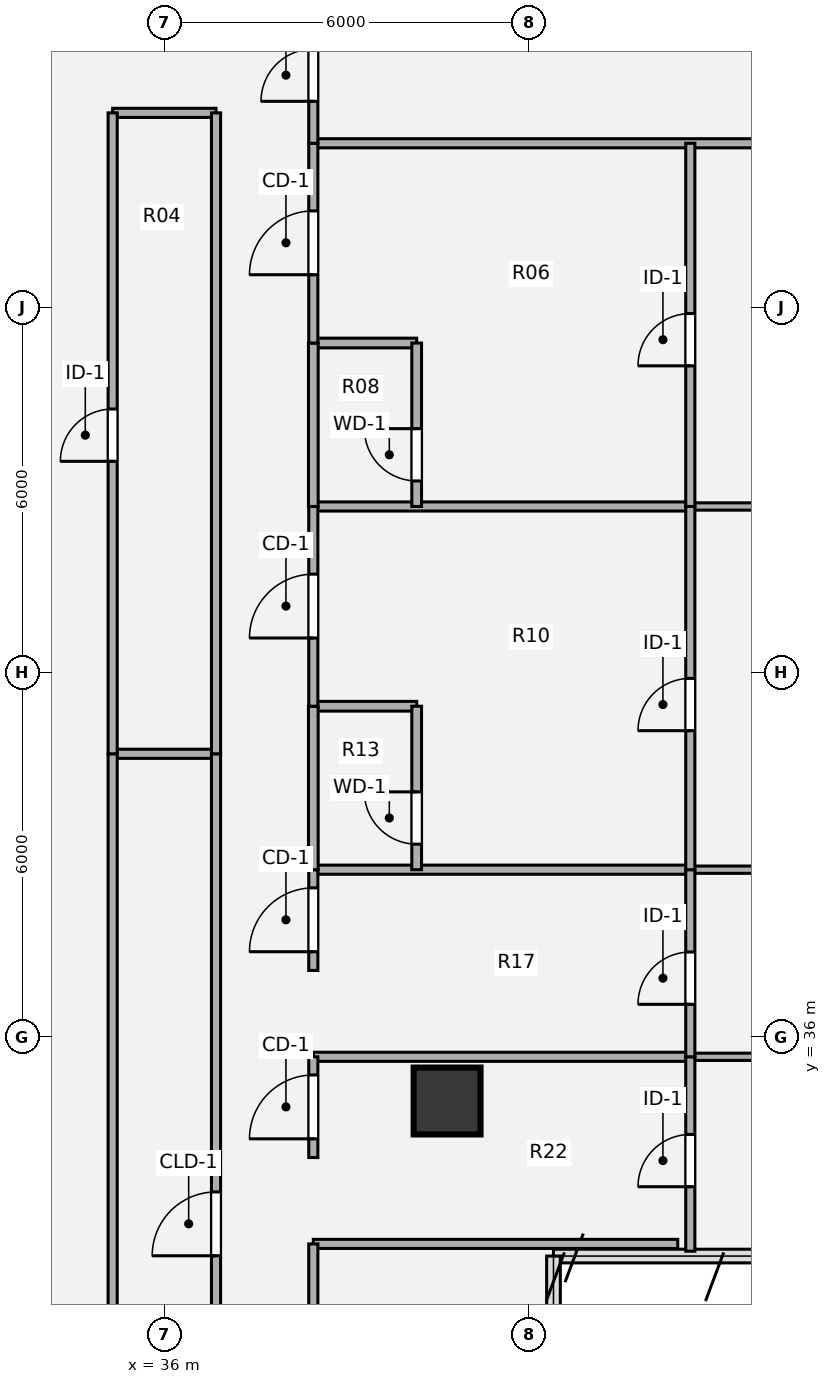
"""IFC4 building model, lengths in metres.
Left out: names, types, materials, properties, quantities, classifications, styles, units other than length and angle.
Written with IfcOpenShell. Run it as: python <this file> out.ifc"""

import sys

from ifc_helpers import new_model, si_unit, direction, frame, frame_2d, origin, origin_2d, place, context, subcontext, project, spatial, rectangle, hollow_circle, extrude, source, transform, mapped, element, fill, save


model = new_model("IFC4")
c1 = context("Model", 3, precision=1e-05, world=origin(), true_north=direction((0.0, 1.0)))
c2 = subcontext(c1, "Body", "Model", "MODEL_VIEW")
j1 = project(units=[si_unit("LENGTHUNIT", "METRE"), si_unit("PLANEANGLEUNIT", "RADIAN")], contexts=[c1])
p1 = place(None, origin())
s1 = spatial("IfcSite", under=j1, at=p1, CompositionType="ELEMENT")
p2 = place(p1, origin())
s2 = spatial("IfcBuilding", under=s1, at=p2, CompositionType="ELEMENT")
p3 = place(p2, frame((0.0, 0.0, 171.54)))
s3 = spatial("IfcBuildingStorey", under=s2, at=p3, CompositionType="ELEMENT", Elevation=171.54)
m1 = source(origin(), c2, "Body", "SweptSolid", [
    extrude(hollow_circle(Radius=0.55, WallThickness=0.04, at=origin_2d()), origin(), (0.0, 0.0, 1.0), 3.78),
])
p4 = place(p3, frame((40.65, 34.95, 0.0), z_axis=(0.0, 0.0, 1.0), x_axis=(1.0, 0.0, 0.0)))
e1 = element("IfcColumn", 1, at=p4, inside=s3, PredefinedType="COLUMN", context=c2, shape_type="MappedRepresentation", body=[
    mapped(m1, transform((0.0, 0.0, 0.0), x_axis=(1.0, 0.0, 0.0), y_axis=(0.0, 1.0, 0.0), z_axis=(0.0, 0.0, 1.0), scale=1.0)),
])
p5 = place(p3, frame((38.45, 32.6, 0.0), z_axis=(0.0, 0.0, 1.0), x_axis=(1.0, 0.0, 0.0)))
e2 = element("IfcWall", 2, at=p5, inside=s3, PredefinedType="PARTITIONING", context=c2, shape_type="SweptSolid", body=[
    extrude(rectangle(XDim=5.993, YDim=0.15, at=frame_2d((2.997, 0.0))), origin(), (0.0, 0.0, 1.0), 3.5),
])
p6 = place(p3, frame((38.45, 35.677, 0.0), z_axis=(0.0, 0.0, 1.0), x_axis=(1.0, 0.0, 0.0)))
e3 = element("IfcWall", 3, at=p6, inside=s3, PredefinedType="PARTITIONING", context=c2, shape_type="SweptSolid", body=[
    extrude(rectangle(XDim=6.2, YDim=0.15, at=frame_2d((3.1, 0.0))), origin(), (0.0, 0.0, 1.0), 2.982),
])
p7 = place(p3, frame((44.65, 35.677, 0.0), z_axis=(0.0, 0.0, 1.0), x_axis=(1.0, 0.0, 0.0)))
e4 = element("IfcWall", 4, at=p7, inside=s3, PredefinedType="PARTITIONING", context=c2, shape_type="SweptSolid", body=[
    extrude(rectangle(XDim=11.47, YDim=0.12, at=frame_2d((5.735, 0.0))), origin(), (0.0, 0.0, 1.0), 2.982),
])
p8 = place(p3, frame((38.45, 38.754, 0.0), z_axis=(0.0, 0.0, 1.0), x_axis=(1.0, 0.0, 0.0)))
e5 = element("IfcWall", 5, at=p8, inside=s3, PredefinedType="PARTITIONING", context=c2, shape_type="SweptSolid", body=[
    extrude(rectangle(XDim=6.2, YDim=0.15, at=frame_2d((3.1, 0.0))), origin(), (0.0, 0.0, 1.0), 2.982),
])
p9 = place(p3, frame((44.65, 38.754, 0.0), z_axis=(0.0, 0.0, 1.0), x_axis=(1.0, 0.0, 0.0)))
e6 = element("IfcWall", 6, at=p9, inside=s3, PredefinedType="PARTITIONING", context=c2, shape_type="SweptSolid", body=[
    extrude(rectangle(XDim=11.47, YDim=0.12, at=frame_2d((5.735, 0.0))), origin(), (0.0, 0.0, 1.0), 2.982),
])
p10 = place(p3, frame((35.15, 40.66, 0.0), z_axis=(0.0, 0.0, 1.0), x_axis=(1.0, 0.0, 0.0)))
e7 = element("IfcWall", 7, at=p10, inside=s3, PredefinedType="PARTITIONING", context=c2, shape_type="SweptSolid", body=[
    extrude(rectangle(XDim=1.7, YDim=0.15, at=frame_2d((0.85, 0.0))), origin(), (0.0, 0.0, 1.0), 3.259),
])
p11 = place(p3, frame((38.45, 41.442, 0.0), z_axis=(0.0, 0.0, 1.0), x_axis=(1.0, 0.0, 0.0)))
e8 = element("IfcWall", 8, at=p11, inside=s3, PredefinedType="PLUMBINGWALL", context=c2, shape_type="SweptSolid", body=[
    extrude(rectangle(XDim=1.7, YDim=0.16, at=frame_2d((0.85, 0.0))), origin(), (0.0, 0.0, 1.0), 3.259),
])
p12 = place(p3, frame((38.45, 44.727, 0.0), z_axis=(0.0, 0.0, 1.0), x_axis=(1.0, 0.0, 0.0)))
e9 = element("IfcWall", 9, at=p12, inside=s3, PredefinedType="PARTITIONING", context=c2, shape_type="SweptSolid", body=[
    extrude(rectangle(XDim=6.2, YDim=0.15, at=frame_2d((3.1, 0.0))), origin(), (0.0, 0.0, 1.0), 3.055),
])
p13 = place(p3, frame((44.65, 44.727, 0.0), z_axis=(0.0, 0.0, 1.0), x_axis=(1.0, 0.0, 0.0)))
e10 = element("IfcWall", 10, at=p13, inside=s3, PredefinedType="PARTITIONING", context=c2, shape_type="SweptSolid", body=[
    extrude(rectangle(XDim=11.47, YDim=0.12, at=frame_2d((5.735, 0.0))), origin(), (0.0, 0.0, 1.0), 3.055),
])
p14 = place(p3, frame((38.45, 47.415, 0.0), z_axis=(0.0, 0.0, 1.0), x_axis=(1.0, 0.0, 0.0)))
e11 = element("IfcWall", 11, at=p14, inside=s3, PredefinedType="PLUMBINGWALL", context=c2, shape_type="SweptSolid", body=[
    extrude(rectangle(XDim=1.7, YDim=0.16, at=frame_2d((0.85, 0.0))), origin(), (0.0, 0.0, 1.0), 3.259),
])
p15 = place(p3, frame((38.45, 50.7, 0.0), z_axis=(0.0, 0.0, 1.0), x_axis=(1.0, 0.0, 0.0)))
e12 = element("IfcWall", 12, at=p15, inside=s3, PredefinedType="PARTITIONING", context=c2, shape_type="SweptSolid", body=[
    extrude(rectangle(XDim=17.569, YDim=0.15, at=frame_2d((8.785, 0.0))), origin(), (0.0, 0.0, 1.0), 3.308),
])
p16 = place(p3, frame((35.15, 51.2, 0.0), z_axis=(0.0, 0.0, 1.0), x_axis=(1.0, 0.0, 0.0)))
e13 = element("IfcWall", 13, at=p16, inside=s3, PredefinedType="PARTITIONING", context=c2, shape_type="SweptSolid", body=[
    extrude(rectangle(XDim=1.7, YDim=0.15, at=frame_2d((0.85, 0.0))), origin(), (0.0, 0.0, 1.0), 3.308),
])
p17 = place(p3, frame((35.15, 25.2, 0.0), z_axis=(0.0, 0.0, 1.0), x_axis=(0.0, 1.0, 0.0)))
e14 = element("IfcWall", 14, at=p17, inside=s3, PredefinedType="PARTITIONING", context=c2, shape_type="SweptSolid", body=[
    extrude(rectangle(XDim=15.46, YDim=0.15, at=frame_2d((7.73, 0.0))), origin(), (0.0, 0.0, 1.0), 3.5),
])
p18 = place(p3, frame((35.15, 40.66, 0.0), z_axis=(0.0, 0.0, 1.0), x_axis=(0.0, 1.0, 0.0)))
e15 = element("IfcWall", 15, at=p18, inside=s3, PredefinedType="PARTITIONING", context=c2, shape_type="SweptSolid", body=[
    extrude(rectangle(XDim=10.54, YDim=0.15, at=frame_2d((5.27, 0.0))), origin(), (0.0, 0.0, 1.0), 3.5),
])
p19 = place(p18, frame((4.81, 0.0, 0.0)))
e16 = element("IfcOpeningElement", 16, at=p19, cuts=e15, PredefinedType="OPENING", context=c2, shape_type="SweptSolid", body=[
    extrude(rectangle(XDim=0.86, YDim=2.1, at=origin_2d()), frame((0.43, 0.085, 1.05), z_axis=(0.0, -1.0, 0.0), x_axis=(1.0, 0.0, 0.0)), (0.0, 0.0, 1.0), 0.17),
])
p20 = place(p3, frame((36.85, 25.2, 0.0), z_axis=(0.0, 0.0, 1.0), x_axis=(0.0, 1.0, 0.0)))
e17 = element("IfcWall", 17, at=p20, inside=s3, PredefinedType="PARTITIONING", context=c2, shape_type="SweptSolid", body=[
    extrude(rectangle(XDim=15.46, YDim=0.15, at=frame_2d((7.73, 0.0))), origin(), (0.0, 0.0, 1.0), 3.5),
])
p21 = place(p20, frame((7.205, 0.0, 0.0)))
e18 = element("IfcOpeningElement", 18, at=p21, cuts=e17, PredefinedType="OPENING", context=c2, shape_type="SweptSolid", body=[
    extrude(rectangle(XDim=1.05, YDim=2.1, at=origin_2d()), frame((0.525, 0.085, 1.05), z_axis=(0.0, -1.0, 0.0), x_axis=(1.0, 0.0, 0.0)), (0.0, 0.0, 1.0), 0.17),
])
p22 = place(p3, frame((36.85, 40.66, 0.0), z_axis=(0.0, 0.0, 1.0), x_axis=(0.0, 1.0, 0.0)))
e19 = element("IfcWall", 19, at=p22, inside=s3, PredefinedType="PARTITIONING", context=c2, shape_type="SweptSolid", body=[
    extrude(rectangle(XDim=10.54, YDim=0.15, at=frame_2d((5.27, 0.0))), origin(), (0.0, 0.0, 1.0), 3.5),
])
p23 = place(p3, frame((38.45, 21.2, 0.0), z_axis=(0.0, 0.0, 1.0), x_axis=(0.0, 1.0, 0.0)))
e20 = element("IfcWall", 20, at=p23, inside=s3, PredefinedType="PARTITIONING", context=c2, shape_type="SweptSolid", body=[
    extrude(rectangle(XDim=11.4, YDim=0.15, at=frame_2d((5.7, 0.0))), origin(), (0.0, 0.0, 1.0), 3.5),
])
p24 = place(p23, frame((5.075, 0.0, 0.0)))
e21 = element("IfcOpeningElement", 21, at=p24, cuts=e20, PredefinedType="OPENING", context=c2, shape_type="SweptSolid", body=[
    extrude(rectangle(XDim=1.05, YDim=2.1, at=origin_2d()), frame((0.525, 0.085, 1.05), z_axis=(0.0, -1.0, 0.0), x_axis=(1.0, 0.0, 0.0)), (0.0, 0.0, 1.0), 0.17),
])
p25 = place(p3, frame((38.45, 34.02, 0.0), z_axis=(0.0, 0.0, 1.0), x_axis=(0.0, 1.0, 0.0)))
e22 = element("IfcWall", 22, at=p25, inside=s3, PredefinedType="PARTITIONING", context=c2, shape_type="SweptSolid", body=[
    extrude(rectangle(XDim=1.657, YDim=0.15, at=frame_2d((0.829, 0.0))), origin(), (0.0, 0.0, 1.0), 3.5),
])
p26 = place(p25, frame((0.308, 0.0, 0.0)))
e23 = element("IfcOpeningElement", 23, at=p26, cuts=e22, PredefinedType="OPENING", context=c2, shape_type="SweptSolid", body=[
    extrude(rectangle(XDim=1.05, YDim=2.1, at=origin_2d()), frame((0.525, 0.085, 1.05), z_axis=(0.0, -1.0, 0.0), x_axis=(1.0, 0.0, 0.0)), (0.0, 0.0, 1.0), 0.17),
])
p27 = place(p3, frame((38.45, 37.097, 0.0), z_axis=(0.0, 0.0, 1.0), x_axis=(0.0, 1.0, 0.0)))
e24 = element("IfcWall", 24, at=p27, inside=s3, PredefinedType="PARTITIONING", context=c2, shape_type="SweptSolid", body=[
    extrude(rectangle(XDim=1.657, YDim=0.15, at=frame_2d((0.829, 0.0))), origin(), (0.0, 0.0, 1.0), 3.5),
])
p28 = place(p27, frame((0.308, 0.0, 0.0)))
e25 = element("IfcOpeningElement", 25, at=p28, cuts=e24, PredefinedType="OPENING", context=c2, shape_type="SweptSolid", body=[
    extrude(rectangle(XDim=1.05, YDim=2.1, at=origin_2d()), frame((0.525, 0.085, 1.05), z_axis=(0.0, -1.0, 0.0), x_axis=(1.0, 0.0, 0.0)), (0.0, 0.0, 1.0), 0.17),
])
p29 = place(p3, frame((38.45, 38.754, 0.0), z_axis=(0.0, 0.0, 1.0), x_axis=(0.0, 1.0, 0.0)))
e26 = element("IfcWall", 26, at=p29, inside=s3, PredefinedType="PLUMBINGWALL", context=c2, shape_type="SweptSolid", body=[
    extrude(rectangle(XDim=2.688, YDim=0.16, at=frame_2d((1.344, 0.0))), origin(), (0.0, 0.0, 1.0), 3.5),
])
p30 = place(p3, frame((38.45, 41.442, 0.0), z_axis=(0.0, 0.0, 1.0), x_axis=(0.0, 1.0, 0.0)))
e27 = element("IfcWall", 27, at=p30, inside=s3, PredefinedType="PARTITIONING", context=c2, shape_type="SweptSolid", body=[
    extrude(rectangle(XDim=3.285, YDim=0.15, at=frame_2d((1.643, 0.0))), origin(), (0.0, 0.0, 1.0), 3.5),
])
p31 = place(p30, frame((1.122, 0.0, 0.0)))
e28 = element("IfcOpeningElement", 28, at=p31, cuts=e27, PredefinedType="OPENING", context=c2, shape_type="SweptSolid", body=[
    extrude(rectangle(XDim=1.05, YDim=2.1, at=origin_2d()), frame((0.525, 0.085, 1.05), z_axis=(0.0, -1.0, 0.0), x_axis=(1.0, 0.0, 0.0)), (0.0, 0.0, 1.0), 0.17),
])
p32 = place(p3, frame((38.45, 44.727, 0.0), z_axis=(0.0, 0.0, 1.0), x_axis=(0.0, 1.0, 0.0)))
e29 = element("IfcWall", 29, at=p32, inside=s3, PredefinedType="PLUMBINGWALL", context=c2, shape_type="SweptSolid", body=[
    extrude(rectangle(XDim=2.688, YDim=0.16, at=frame_2d((1.344, 0.0))), origin(), (0.0, 0.0, 1.0), 3.5),
])
p33 = place(p3, frame((38.45, 47.415, 0.0), z_axis=(0.0, 0.0, 1.0), x_axis=(0.0, 1.0, 0.0)))
e30 = element("IfcWall", 30, at=p33, inside=s3, PredefinedType="PARTITIONING", context=c2, shape_type="SweptSolid", body=[
    extrude(rectangle(XDim=3.285, YDim=0.15, at=frame_2d((1.643, 0.0))), origin(), (0.0, 0.0, 1.0), 3.5),
])
p34 = place(p33, frame((1.123, 0.0, 0.0)))
e31 = element("IfcOpeningElement", 31, at=p34, cuts=e30, PredefinedType="OPENING", context=c2, shape_type="SweptSolid", body=[
    extrude(rectangle(XDim=1.05, YDim=2.1, at=origin_2d()), frame((0.525, 0.085, 1.05), z_axis=(0.0, -1.0, 0.0), x_axis=(1.0, 0.0, 0.0)), (0.0, 0.0, 1.0), 0.17),
])
p35 = place(p3, frame((38.45, 50.7, 0.0), z_axis=(0.0, 0.0, 1.0), x_axis=(0.0, 1.0, 0.0)))
e32 = element("IfcWall", 32, at=p35, inside=s3, PredefinedType="PARTITIONING", context=c2, shape_type="SweptSolid", body=[
    extrude(rectangle(XDim=2.3, YDim=0.15, at=frame_2d((1.15, 0.0))), origin(), (0.0, 0.0, 1.0), 3.5),
])
p36 = place(p35, frame((0.69, 0.0, 0.0)))
e33 = element("IfcOpeningElement", 33, at=p36, cuts=e32, PredefinedType="OPENING", context=c2, shape_type="SweptSolid", body=[
    extrude(rectangle(XDim=0.86, YDim=2.1, at=origin_2d()), frame((0.43, 0.085, 1.05), z_axis=(0.0, -1.0, 0.0), x_axis=(1.0, 0.0, 0.0)), (0.0, 0.0, 1.0), 0.17),
])
p37 = place(p3, frame((40.15, 38.754, 0.0), z_axis=(0.0, 0.0, 1.0), x_axis=(0.0, 1.0, 0.0)))
e34 = element("IfcWall", 34, at=p37, inside=s3, PredefinedType="PLUMBINGWALL", context=c2, shape_type="SweptSolid", body=[
    extrude(rectangle(XDim=2.688, YDim=0.16, at=frame_2d((1.344, 0.0))), origin(), (0.0, 0.0, 1.0), 3.5),
])
p38 = place(p37, frame((0.42, 0.0, 0.0)))
e35 = element("IfcOpeningElement", 35, at=p38, cuts=e34, PredefinedType="OPENING", context=c2, shape_type="SweptSolid", body=[
    extrude(rectangle(XDim=0.86, YDim=2.1, at=origin_2d()), frame((0.43, 0.09, 1.05), z_axis=(0.0, -1.0, 0.0), x_axis=(1.0, 0.0, 0.0)), (0.0, 0.0, 1.0), 0.18),
])
p39 = place(p3, frame((40.15, 44.727, 0.0), z_axis=(0.0, 0.0, 1.0), x_axis=(0.0, 1.0, 0.0)))
e36 = element("IfcWall", 36, at=p39, inside=s3, PredefinedType="PLUMBINGWALL", context=c2, shape_type="SweptSolid", body=[
    extrude(rectangle(XDim=2.688, YDim=0.16, at=frame_2d((1.344, 0.0))), origin(), (0.0, 0.0, 1.0), 3.5),
])
p40 = place(p39, frame((0.42, 0.0, 0.0)))
e37 = element("IfcOpeningElement", 37, at=p40, cuts=e36, PredefinedType="OPENING", context=c2, shape_type="SweptSolid", body=[
    extrude(rectangle(XDim=0.86, YDim=2.1, at=origin_2d()), frame((0.43, 0.09, 1.05), z_axis=(0.0, -1.0, 0.0), x_axis=(1.0, 0.0, 0.0)), (0.0, 0.0, 1.0), 0.18),
])
p41 = place(p3, frame((44.65, 32.48, 0.0), z_axis=(0.0, 0.0, 1.0), x_axis=(0.0, 1.0, 0.0)))
e38 = element("IfcWall", 38, at=p41, inside=s3, PredefinedType="PARTITIONING", context=c2, shape_type="SweptSolid", body=[
    extrude(rectangle(XDim=3.197, YDim=0.15, at=frame_2d((1.599, 0.0))), origin(), (0.0, 0.0, 1.0), 3.5),
])
p42 = place(p41, frame((1.06, 0.0, 0.0)))
e39 = element("IfcOpeningElement", 39, at=p42, cuts=e38, PredefinedType="OPENING", context=c2, shape_type="SweptSolid", body=[
    extrude(rectangle(XDim=0.86, YDim=2.1, at=origin_2d()), frame((0.43, 0.085, 1.05), z_axis=(0.0, -1.0, 0.0), x_axis=(1.0, 0.0, 0.0)), (0.0, 0.0, 1.0), 0.17),
])
p43 = place(p3, frame((44.65, 35.677, 0.0), z_axis=(0.0, 0.0, 1.0), x_axis=(0.0, 1.0, 0.0)))
e40 = element("IfcWall", 40, at=p43, inside=s3, PredefinedType="PARTITIONING", context=c2, shape_type="SweptSolid", body=[
    extrude(rectangle(XDim=3.077, YDim=0.15, at=frame_2d((1.539, 0.0))), origin(), (0.0, 0.0, 1.0), 3.5),
])
p44 = place(p43, frame((0.863, 0.0, 0.0)))
e41 = element("IfcOpeningElement", 41, at=p44, cuts=e40, PredefinedType="OPENING", context=c2, shape_type="SweptSolid", body=[
    extrude(rectangle(XDim=0.86, YDim=2.1, at=origin_2d()), frame((0.43, 0.085, 1.05), z_axis=(0.0, -1.0, 0.0), x_axis=(1.0, 0.0, 0.0)), (0.0, 0.0, 1.0), 0.17),
])
p45 = place(p3, frame((44.65, 38.754, 0.0), z_axis=(0.0, 0.0, 1.0), x_axis=(0.0, 1.0, 0.0)))
e42 = element("IfcWall", 42, at=p45, inside=s3, PredefinedType="PARTITIONING", context=c2, shape_type="SweptSolid", body=[
    extrude(rectangle(XDim=5.973, YDim=0.15, at=frame_2d((2.987, 0.0))), origin(), (0.0, 0.0, 1.0), 3.5),
])
p46 = place(p45, frame((2.286, 0.0, 0.0)))
e43 = element("IfcOpeningElement", 43, at=p46, cuts=e42, PredefinedType="OPENING", context=c2, shape_type="SweptSolid", body=[
    extrude(rectangle(XDim=0.86, YDim=2.1, at=origin_2d()), frame((0.43, 0.085, 1.05), z_axis=(0.0, -1.0, 0.0), x_axis=(1.0, 0.0, 0.0)), (0.0, 0.0, 1.0), 0.17),
])
p47 = place(p3, frame((44.65, 44.727, 0.0), z_axis=(0.0, 0.0, 1.0), x_axis=(0.0, 1.0, 0.0)))
e44 = element("IfcWall", 44, at=p47, inside=s3, PredefinedType="PARTITIONING", context=c2, shape_type="SweptSolid", body=[
    extrude(rectangle(XDim=5.973, YDim=0.15, at=frame_2d((2.986, 0.0))), origin(), (0.0, 0.0, 1.0), 3.5),
])
p48 = place(p47, frame((2.313, 0.0, 0.0)))
e45 = element("IfcOpeningElement", 45, at=p48, cuts=e44, PredefinedType="OPENING", context=c2, shape_type="SweptSolid", body=[
    extrude(rectangle(XDim=0.86, YDim=2.1, at=origin_2d()), frame((0.43, 0.085, 1.05), z_axis=(0.0, -1.0, 0.0), x_axis=(1.0, 0.0, 0.0)), (0.0, 0.0, 1.0), 0.17),
])
m2 = source(origin(), c2, "Body", "SweptSolid", [
    extrude(rectangle(XDim=0.86, YDim=2.1, at=origin_2d()), frame((0.43, 0.025, 1.05), z_axis=(0.0, -1.0, 0.0), x_axis=(1.0, 0.0, 0.0)), (0.0, 0.0, 1.0), 0.05),
])
p49 = place(p19, origin())
e46 = element("IfcDoor", 46, at=p49, inside=s3, OperationType="SINGLE_SWING_LEFT", PredefinedType="DOOR", context=c2, shape_type="MappedRepresentation", body=[
    mapped(m2, transform((0.0, 0.0, 0.0), x_axis=(1.0, 0.0, 0.0), y_axis=(0.0, 1.0, 0.0), z_axis=(0.0, 0.0, 1.0), scale=1.0)),
])
fill(e16, e46)
m3 = source(origin(), c2, "Body", "SweptSolid", [
    extrude(rectangle(XDim=1.05, YDim=2.1, at=origin_2d()), frame((0.525, 0.025, 1.05), z_axis=(0.0, -1.0, 0.0), x_axis=(1.0, 0.0, 0.0)), (0.0, 0.0, 1.0), 0.05),
])
p50 = place(p21, origin())
e47 = element("IfcDoor", 47, at=p50, inside=s3, OperationType="SINGLE_SWING_LEFT", PredefinedType="DOOR", context=c2, shape_type="MappedRepresentation", body=[
    mapped(m3, transform((0.0, 0.0, 0.0), x_axis=(1.0, 0.0, 0.0), y_axis=(0.0, 1.0, 0.0), z_axis=(0.0, 0.0, 1.0), scale=1.0)),
])
fill(e18, e47)
m4 = source(origin(), c2, "Body", "SweptSolid", [
    extrude(rectangle(XDim=1.05, YDim=2.1, at=origin_2d()), frame((0.525, 0.025, 1.05), z_axis=(0.0, -1.0, 0.0), x_axis=(1.0, 0.0, 0.0)), (0.0, 0.0, 1.0), 0.05),
])
p51 = place(p26, origin())
e48 = element("IfcDoor", 48, at=p51, inside=s3, OperationType="SINGLE_SWING_LEFT", PredefinedType="DOOR", context=c2, shape_type="MappedRepresentation", body=[
    mapped(m4, transform((0.0, 0.0, 0.0), x_axis=(1.0, 0.0, 0.0), y_axis=(0.0, 1.0, 0.0), z_axis=(0.0, 0.0, 1.0), scale=1.0)),
])
fill(e23, e48)
p52 = place(p28, origin())
e49 = element("IfcDoor", 49, at=p52, inside=s3, OperationType="SINGLE_SWING_LEFT", PredefinedType="DOOR", context=c2, shape_type="MappedRepresentation", body=[
    mapped(m4, transform((0.0, 0.0, 0.0), x_axis=(1.0, 0.0, 0.0), y_axis=(0.0, 1.0, 0.0), z_axis=(0.0, 0.0, 1.0), scale=1.0)),
])
fill(e25, e49)
p53 = place(p31, origin())
e50 = element("IfcDoor", 50, at=p53, inside=s3, OperationType="SINGLE_SWING_LEFT", PredefinedType="DOOR", context=c2, shape_type="MappedRepresentation", body=[
    mapped(m4, transform((0.0, 0.0, 0.0), x_axis=(1.0, 0.0, 0.0), y_axis=(0.0, 1.0, 0.0), z_axis=(0.0, 0.0, 1.0), scale=1.0)),
])
fill(e28, e50)
p54 = place(p34, origin())
e51 = element("IfcDoor", 51, at=p54, inside=s3, OperationType="SINGLE_SWING_LEFT", PredefinedType="DOOR", context=c2, shape_type="MappedRepresentation", body=[
    mapped(m4, transform((0.0, 0.0, 0.0), x_axis=(1.0, 0.0, 0.0), y_axis=(0.0, 1.0, 0.0), z_axis=(0.0, 0.0, 1.0), scale=1.0)),
])
fill(e31, e51)
p55 = place(p36, origin())
e52 = element("IfcDoor", 52, at=p55, inside=s3, OperationType="SINGLE_SWING_LEFT", PredefinedType="DOOR", context=c2, shape_type="MappedRepresentation", body=[
    mapped(m2, transform((0.0, 0.0, 0.0), x_axis=(1.0, 0.0, 0.0), y_axis=(0.0, 1.0, 0.0), z_axis=(0.0, 0.0, 1.0), scale=1.0)),
])
fill(e33, e52)
m5 = source(origin(), c2, "Body", "SweptSolid", [
    extrude(rectangle(XDim=0.86, YDim=2.1, at=origin_2d()), frame((0.43, 0.025, 1.05), z_axis=(0.0, -1.0, 0.0), x_axis=(1.0, 0.0, 0.0)), (0.0, 0.0, 1.0), 0.05),
])
p56 = place(p38, origin())
e53 = element("IfcDoor", 53, at=p56, inside=s3, OperationType="SINGLE_SWING_RIGHT", PredefinedType="DOOR", context=c2, shape_type="MappedRepresentation", body=[
    mapped(m5, transform((0.0, 0.0, 0.0), x_axis=(1.0, 0.0, 0.0), y_axis=(0.0, 1.0, 0.0), z_axis=(0.0, 0.0, 1.0), scale=1.0)),
])
fill(e35, e53)
p57 = place(p40, origin())
e54 = element("IfcDoor", 54, at=p57, inside=s3, OperationType="SINGLE_SWING_RIGHT", PredefinedType="DOOR", context=c2, shape_type="MappedRepresentation", body=[
    mapped(m5, transform((0.0, 0.0, 0.0), x_axis=(1.0, 0.0, 0.0), y_axis=(0.0, 1.0, 0.0), z_axis=(0.0, 0.0, 1.0), scale=1.0)),
])
fill(e37, e54)
p58 = place(p42, origin())
e55 = element("IfcDoor", 55, at=p58, inside=s3, OperationType="SINGLE_SWING_LEFT", PredefinedType="DOOR", context=c2, shape_type="MappedRepresentation", body=[
    mapped(m2, transform((0.0, 0.0, 0.0), x_axis=(1.0, 0.0, 0.0), y_axis=(0.0, 1.0, 0.0), z_axis=(0.0, 0.0, 1.0), scale=1.0)),
])
fill(e39, e55)
p59 = place(p44, origin())
e56 = element("IfcDoor", 56, at=p59, inside=s3, OperationType="SINGLE_SWING_LEFT", PredefinedType="DOOR", context=c2, shape_type="MappedRepresentation", body=[
    mapped(m2, transform((0.0, 0.0, 0.0), x_axis=(1.0, 0.0, 0.0), y_axis=(0.0, 1.0, 0.0), z_axis=(0.0, 0.0, 1.0), scale=1.0)),
])
fill(e41, e56)
p60 = place(p46, origin())
e57 = element("IfcDoor", 57, at=p60, inside=s3, OperationType="SINGLE_SWING_LEFT", PredefinedType="DOOR", context=c2, shape_type="MappedRepresentation", body=[
    mapped(m2, transform((0.0, 0.0, 0.0), x_axis=(1.0, 0.0, 0.0), y_axis=(0.0, 1.0, 0.0), z_axis=(0.0, 0.0, 1.0), scale=1.0)),
])
fill(e43, e57)
p61 = place(p48, origin())
e58 = element("IfcDoor", 58, at=p61, inside=s3, OperationType="SINGLE_SWING_LEFT", PredefinedType="DOOR", context=c2, shape_type="MappedRepresentation", body=[
    mapped(m2, transform((0.0, 0.0, 0.0), x_axis=(1.0, 0.0, 0.0), y_axis=(0.0, 1.0, 0.0), z_axis=(0.0, 0.0, 1.0), scale=1.0)),
])
fill(e45, e58)
save(model, sys.argv[1])
